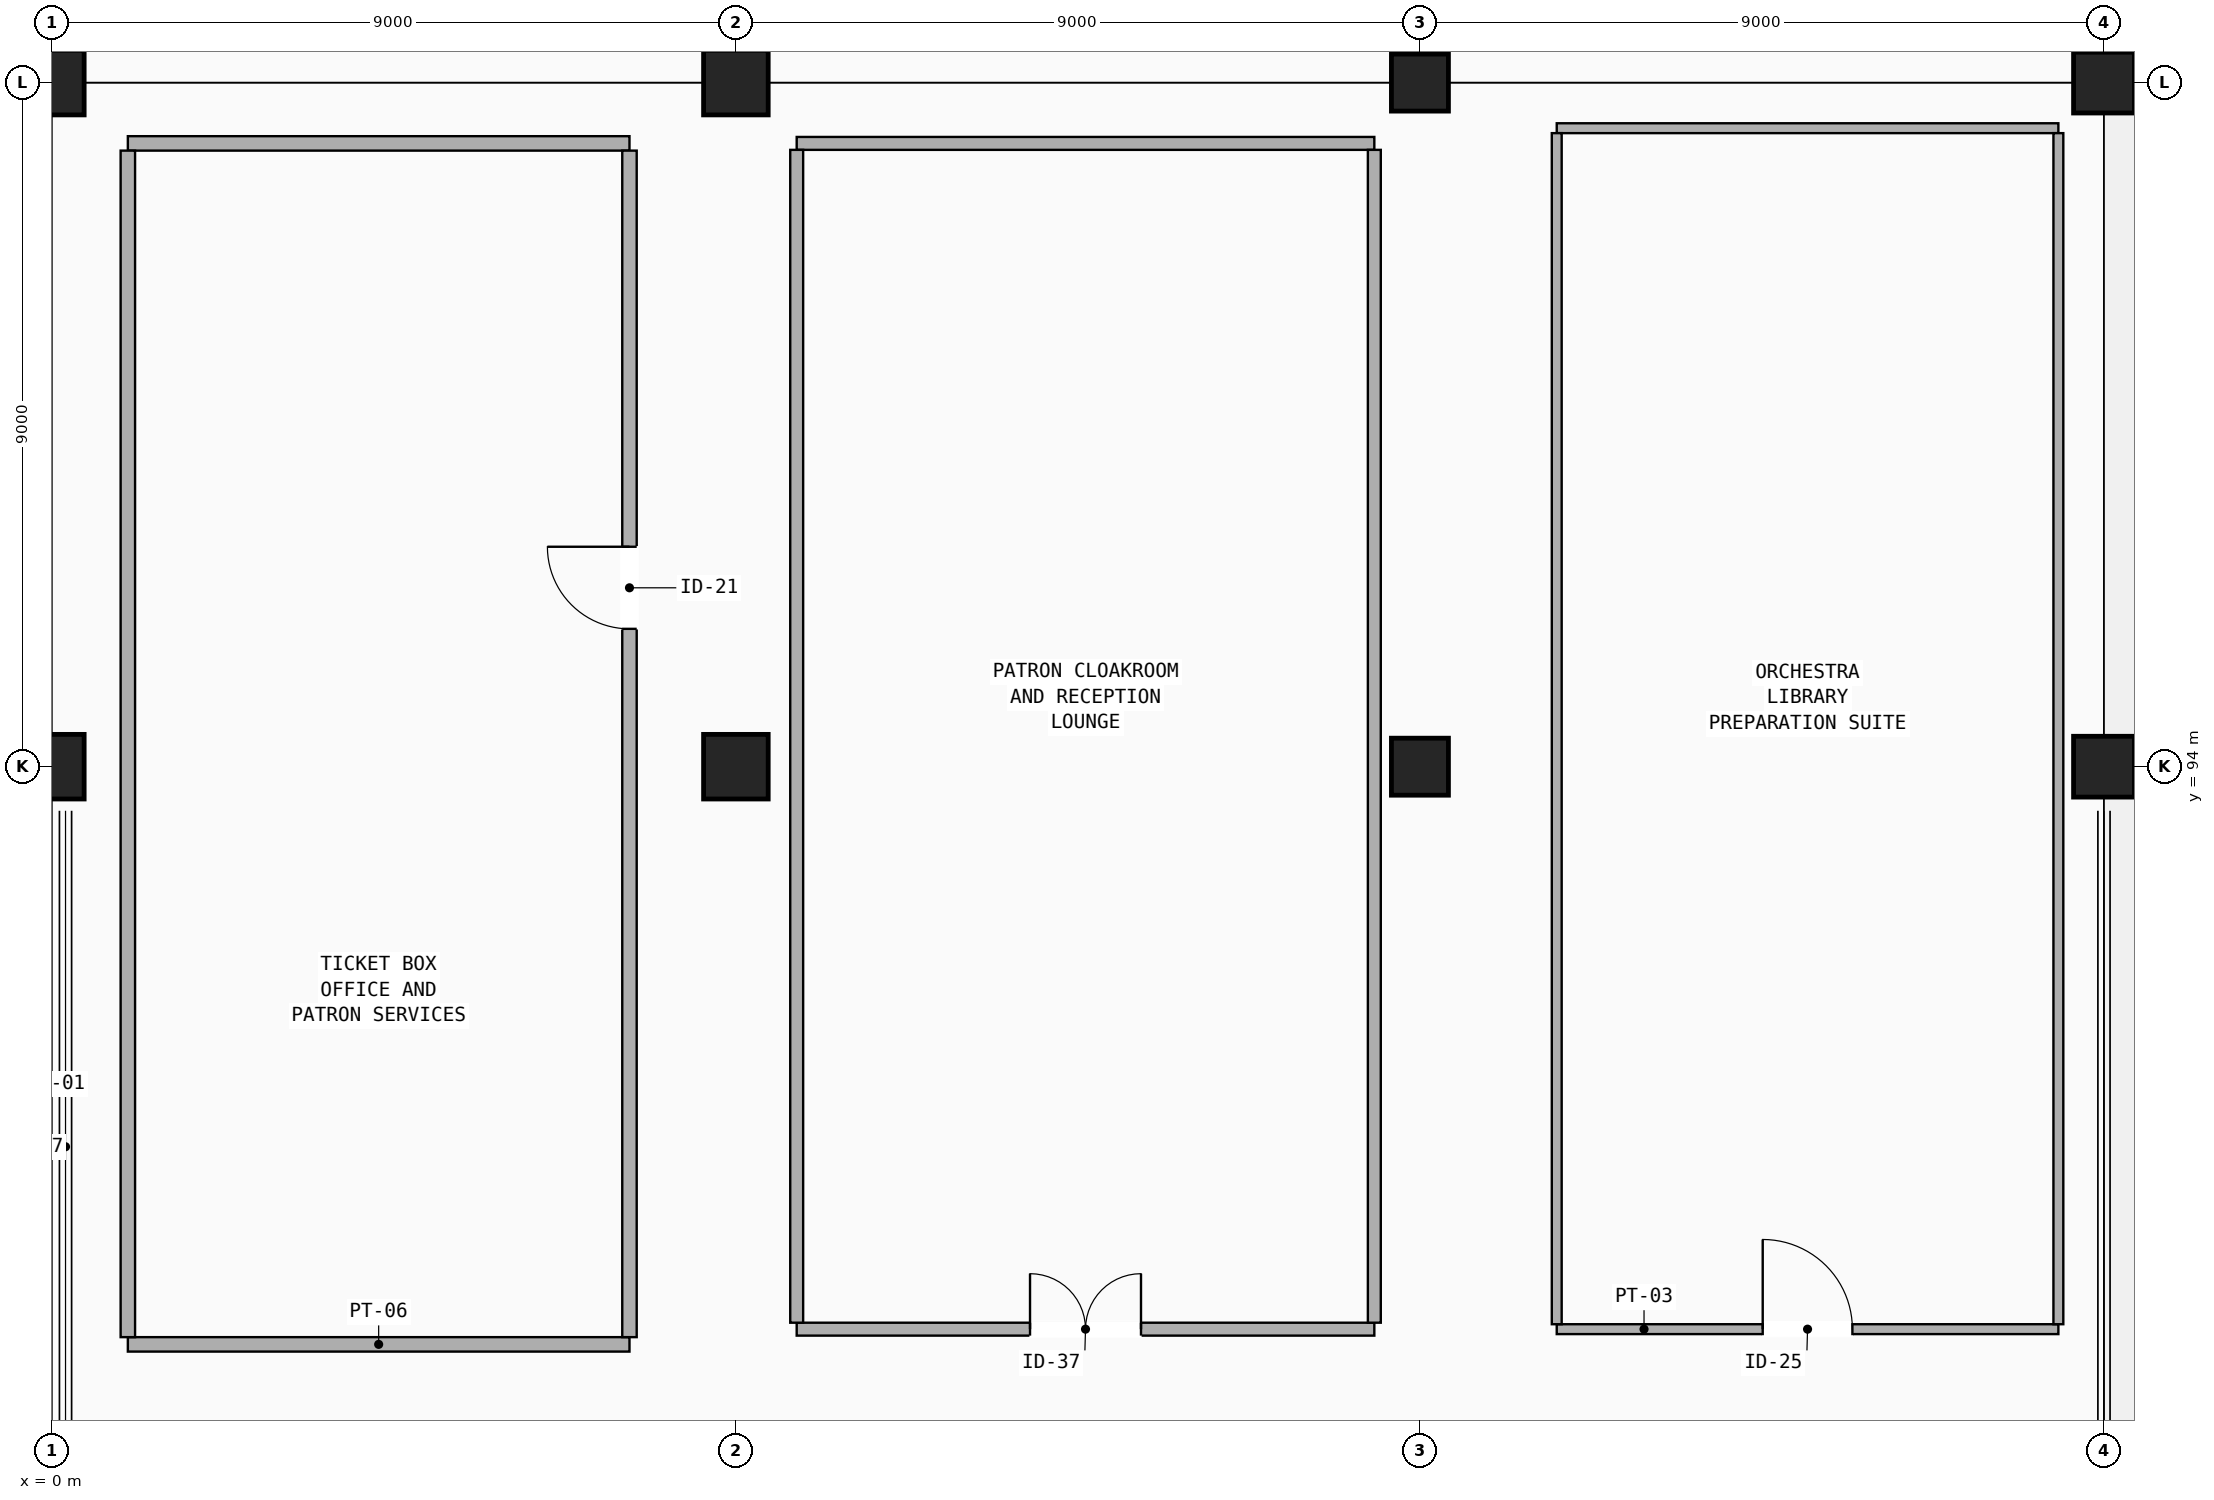
"""IFC4 building model, lengths in metres.
Left out: names, types, materials, properties, quantities, classifications, styles, units other than length and angle.
Written with IfcOpenShell. Run it as: python <this file> out.ifc"""

import sys

from ifc_helpers import new_model, si_unit, direction, frame, frame_2d, origin, origin_2d, place, context, subcontext, project, spatial, rectangle, circle, extrude, element, fill, save


model = new_model("IFC4")
c1 = context("Model", 3, precision=1e-05, world=origin(), true_north=direction((0.0, 1.0)))
c2 = subcontext(c1, "Body", "Model", "MODEL_VIEW")
j1 = project(units=[si_unit("LENGTHUNIT", "METRE"), si_unit("PLANEANGLEUNIT", "RADIAN")], contexts=[c1])
p1 = place(None, origin())
s1 = spatial("IfcSite", under=j1, at=p1, CompositionType="ELEMENT")
p2 = place(p1, origin())
s2 = spatial("IfcBuilding", under=s1, at=p2, CompositionType="ELEMENT")
p3 = place(p2, origin())
s3 = spatial("IfcBuildingStorey", under=s2, at=p3, CompositionType="ELEMENT", Elevation=0.0)
for number, where, z_axis, x_axis in (
    (1, (0.0, 94.0, 0.0), (0.0, 0.0, 1.0), (1.0, 0.0, 0.0)),
    (2, (0.0, 103.0, 0.0), (0.0, 0.0, 1.0), (1.0, 0.0, 0.0)),
    (3, (9.0, 94.0, 0.0), (0.0, 0.0, 1.0), (1.0, 0.0, 0.0)),
    (4, (9.0, 103.0, 0.0), (0.0, 0.0, 1.0), (1.0, 0.0, 0.0)),
):
    element("IfcColumn", number, at=place(p3, frame(where, z_axis=z_axis, x_axis=x_axis)), inside=s3, PredefinedType="COLUMN", context=c2, shape_type="SweptSolid", body=[
        extrude(circle(Radius=0.425, at=origin_2d()), origin(), (0.0, 0.0, 1.0), 5.1),
    ])
for number, where, z_axis, x_axis in (
    (5, (18.0, 94.0, 0.0), (0.0, 0.0, 1.0), (1.0, 0.0, 0.0)),
    (6, (18.0, 103.0, 0.0), (0.0, 0.0, 1.0), (1.0, 0.0, 0.0)),
):
    element("IfcColumn", number, at=place(p3, frame(where, z_axis=z_axis, x_axis=x_axis)), inside=s3, PredefinedType="COLUMN", context=c2, shape_type="SweptSolid", body=[
        extrude(rectangle(XDim=0.75, YDim=0.75, at=origin_2d()), origin(), (0.0, 0.0, 1.0), 5.1),
    ])
for number, where, z_axis, x_axis in (
    (7, (27.0, 94.0, 0.0), (0.0, 0.0, 1.0), (1.0, 0.0, 0.0)),
    (8, (27.0, 103.0, 0.0), (0.0, 0.0, 1.0), (1.0, 0.0, 0.0)),
):
    element("IfcColumn", number, at=place(p3, frame(where, z_axis=z_axis, x_axis=x_axis)), inside=s3, PredefinedType="COLUMN", context=c2, shape_type="SweptSolid", body=[
        extrude(rectangle(XDim=0.8, YDim=0.8, at=origin_2d()), origin(), (0.0, 0.0, 1.0), 5.1),
    ])
p4 = place(p3, frame((9.0, 103.391, 0.0), z_axis=(0.0, 0.0, 1.0), x_axis=(0.0, 1.0, 0.0)))
e9 = element("IfcWall", 9, at=p4, inside=s3, PredefinedType="STANDARD", context=c2, shape_type="SweptSolid", body=[
    extrude(rectangle(XDim=8.218, YDim=0.36, at=frame_2d((4.109, 0.0))), origin(), (0.0, 0.0, 1.0), 4.18),
])
p5 = place(p4, frame((0.959, 0.0, 0.0)))
e10 = element("IfcOpeningElement", 10, at=p5, cuts=e9, PredefinedType="OPENING", context=c2, shape_type="SweptSolid", body=[
    extrude(rectangle(XDim=6.5, YDim=3.2, at=frame_2d((3.25, 1.6))), frame((0.0, 0.19, 0.0), z_axis=(0.0, -1.0, 0.0), x_axis=(1.0, 0.0, 0.0)), (0.0, 0.0, 1.0), 0.38),
])
for number, where, z_axis, x_axis in (
    (11, (1.0, 86.4, 0.0), (0.0, 0.0, 1.0), (1.0, 0.0, 0.0)),
    (12, (1.0, 102.2, 0.0), (0.0, 0.0, 1.0), (1.0, 0.0, 0.0)),
):
    element("IfcWall", number, at=place(p3, frame(where, z_axis=z_axis, x_axis=x_axis)), inside=s3, PredefinedType="PARTITIONING", context=c2, shape_type="SweptSolid", body=[
        extrude(rectangle(XDim=6.6, YDim=0.19, at=frame_2d((3.3, 0.0))), origin(), (0.0, 0.0, 1.0), 4.85),
    ])
p6 = place(p3, frame((1.0, 86.495, 0.0), z_axis=(0.0, 0.0, 1.0), x_axis=(0.0, 1.0, 0.0)))
e13 = element("IfcWall", 13, at=p6, inside=s3, PredefinedType="PARTITIONING", context=c2, shape_type="SweptSolid", body=[
    extrude(rectangle(XDim=15.61, YDim=0.19, at=frame_2d((7.805, 0.0))), origin(), (0.0, 0.0, 1.0), 4.08),
])
p7 = place(p3, frame((7.6, 86.495, 0.0), z_axis=(0.0, 0.0, 1.0), x_axis=(0.0, 1.0, 0.0)))
e14 = element("IfcWall", 14, at=p7, inside=s3, PredefinedType="PARTITIONING", context=c2, shape_type="SweptSolid", body=[
    extrude(rectangle(XDim=15.61, YDim=0.19, at=frame_2d((7.805, 0.0))), origin(), (0.0, 0.0, 1.0), 4.08),
])
p8 = place(p7, frame((9.319, 0.0, 0.0)))
e15 = element("IfcOpeningElement", 15, at=p8, cuts=e14, PredefinedType="OPENING", context=c2, shape_type="SweptSolid", body=[
    extrude(rectangle(XDim=1.08, YDim=2.22, at=frame_2d((0.54, 1.11))), frame((0.0, 0.105, 0.0), z_axis=(0.0, -1.0, 0.0), x_axis=(1.0, 0.0, 0.0)), (0.0, 0.0, 1.0), 0.21),
])
p9 = place(p3, frame((19.8, 86.6, 0.0), z_axis=(0.0, 0.0, 1.0), x_axis=(1.0, 0.0, 0.0)))
e16 = element("IfcWall", 16, at=p9, inside=s3, PredefinedType="PARTITIONING", context=c2, shape_type="SweptSolid", body=[
    extrude(rectangle(XDim=6.6, YDim=0.13, at=frame_2d((3.3, 0.0))), origin(), (0.0, 0.0, 1.0), 4.85),
])
p10 = place(p9, frame((2.71, 0.0, 0.0)))
e17 = element("IfcOpeningElement", 17, at=p10, cuts=e16, PredefinedType="OPENING", context=c2, shape_type="SweptSolid", body=[
    extrude(rectangle(XDim=1.18, YDim=2.08, at=frame_2d((0.59, 1.04))), frame((0.0, 0.075, 0.0), z_axis=(0.0, -1.0, 0.0), x_axis=(1.0, 0.0, 0.0)), (0.0, 0.0, 1.0), 0.15),
])
p11 = place(p3, frame((19.8, 102.4, 0.0), z_axis=(0.0, 0.0, 1.0), x_axis=(1.0, 0.0, 0.0)))
e18 = element("IfcWall", 18, at=p11, inside=s3, PredefinedType="PARTITIONING", context=c2, shape_type="SweptSolid", body=[
    extrude(rectangle(XDim=6.6, YDim=0.13, at=frame_2d((3.3, 0.0))), origin(), (0.0, 0.0, 1.0), 4.85),
])
for number, where, z_axis, x_axis in (
    (19, (19.8, 86.665, 0.0), (0.0, 0.0, 1.0), (0.0, 1.0, 0.0)),
    (20, (26.4, 86.665, 0.0), (0.0, 0.0, 1.0), (0.0, 1.0, 0.0)),
):
    element("IfcWall", number, at=place(p3, frame(where, z_axis=z_axis, x_axis=x_axis)), inside=s3, PredefinedType="PARTITIONING", context=c2, shape_type="SweptSolid", body=[
        extrude(rectangle(XDim=15.67, YDim=0.13, at=frame_2d((7.835, 0.0))), origin(), (0.0, 0.0, 1.0), 4.1),
    ])
p12 = place(p3, frame((9.8, 86.6, 0.0), z_axis=(0.0, 0.0, 1.0), x_axis=(1.0, 0.0, 0.0)))
e21 = element("IfcWall", 21, at=p12, inside=s3, PredefinedType="PARTITIONING", context=c2, shape_type="SweptSolid", body=[
    extrude(rectangle(XDim=7.6, YDim=0.17, at=frame_2d((3.8, 0.0))), origin(), (0.0, 0.0, 1.0), 4.85),
])
p13 = place(p12, frame((3.07, 0.0, 0.0)))
e22 = element("IfcOpeningElement", 22, at=p13, cuts=e21, PredefinedType="OPENING", context=c2, shape_type="SweptSolid", body=[
    extrude(rectangle(XDim=1.46, YDim=2.08, at=frame_2d((0.73, 1.04))), frame((0.0, 0.095, 0.0), z_axis=(0.0, -1.0, 0.0), x_axis=(1.0, 0.0, 0.0)), (0.0, 0.0, 1.0), 0.19),
])
p14 = place(p3, frame((9.8, 102.2, 0.0), z_axis=(0.0, 0.0, 1.0), x_axis=(1.0, 0.0, 0.0)))
e23 = element("IfcWall", 23, at=p14, inside=s3, PredefinedType="PARTITIONING", context=c2, shape_type="SweptSolid", body=[
    extrude(rectangle(XDim=7.6, YDim=0.17, at=frame_2d((3.8, 0.0))), origin(), (0.0, 0.0, 1.0), 4.85),
])
for number, where, z_axis, x_axis in (
    (24, (9.8, 86.685, 0.0), (0.0, 0.0, 1.0), (0.0, 1.0, 0.0)),
    (25, (17.4, 86.685, 0.0), (0.0, 0.0, 1.0), (0.0, 1.0, 0.0)),
):
    element("IfcWall", number, at=place(p3, frame(where, z_axis=z_axis, x_axis=x_axis)), inside=s3, PredefinedType="PARTITIONING", context=c2, shape_type="SweptSolid", body=[
        extrude(rectangle(XDim=15.43, YDim=0.17, at=frame_2d((7.715, 0.0))), origin(), (0.0, 0.0, 1.0), 4.08),
    ])
p15 = place(p8, origin())
e26 = element("IfcDoor", 26, at=p15, inside=s3, OperationType="SINGLE_SWING_RIGHT", PredefinedType="DOOR", context=c2, shape_type="SweptSolid", body=[
    extrude(rectangle(XDim=1.08, YDim=2.22, at=frame_2d((0.54, 1.11))), frame((0.0, 0.025, 0.0), z_axis=(0.0, -1.0, 0.0), x_axis=(1.0, 0.0, 0.0)), (0.0, 0.0, 1.0), 0.05),
])
fill(e15, e26)
p16 = place(p10, origin())
e27 = element("IfcDoor", 27, at=p16, inside=s3, OperationType="SINGLE_SWING_LEFT", PredefinedType="DOOR", context=c2, shape_type="SweptSolid", body=[
    extrude(rectangle(XDim=1.18, YDim=2.08, at=frame_2d((0.59, 1.04))), frame((0.0, 0.025, 0.0), z_axis=(0.0, -1.0, 0.0), x_axis=(1.0, 0.0, 0.0)), (0.0, 0.0, 1.0), 0.05),
])
fill(e17, e27)
p17 = place(p13, origin())
e28 = element("IfcDoor", 28, at=p17, inside=s3, OperationType="DOUBLE_DOOR_SINGLE_SWING", PredefinedType="DOOR", context=c2, shape_type="SweptSolid", body=[
    extrude(rectangle(XDim=1.46, YDim=2.08, at=frame_2d((0.73, 1.04))), frame((0.0, 0.025, 0.0), z_axis=(0.0, -1.0, 0.0), x_axis=(1.0, 0.0, 0.0)), (0.0, 0.0, 1.0), 0.05),
])
fill(e22, e28)
save(model, sys.argv[1])
